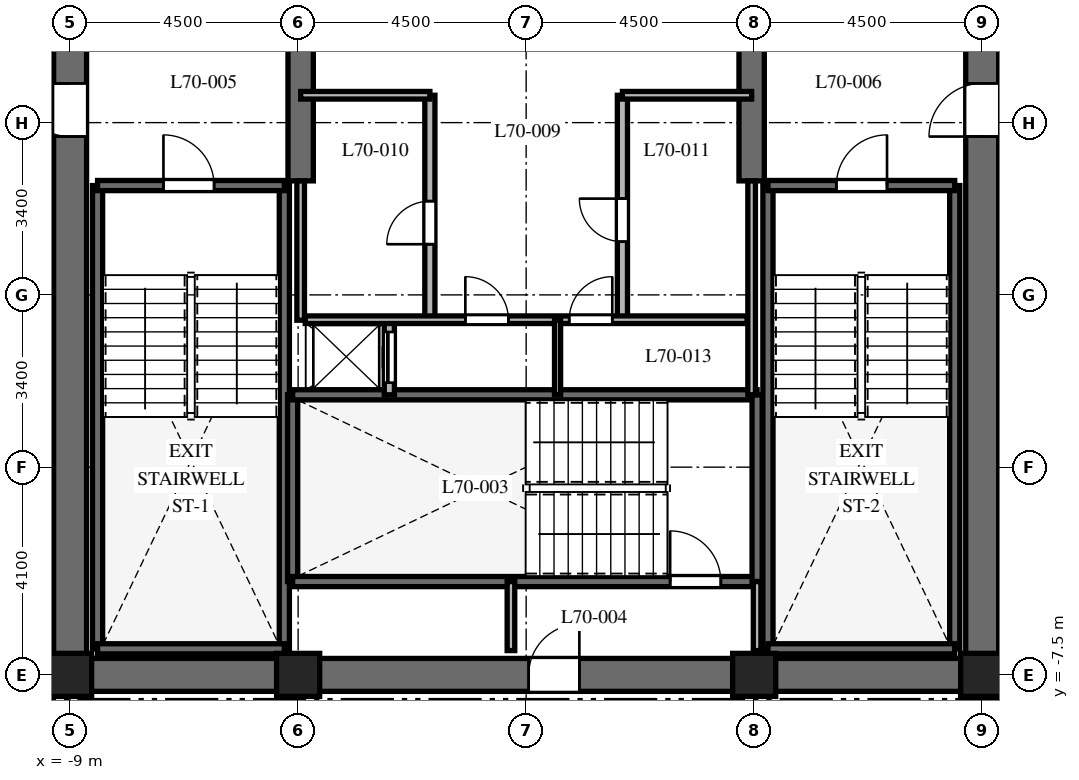
"""IFC4 building model, lengths in metres.
Left out: names, types, materials, properties, quantities, classifications, styles, units other than length and angle.
Written with IfcOpenShell. Run it as: python <this file> out.ifc"""

import sys

from ifc_helpers import new_model, si_unit, direction, frame, frame_2d, origin, origin_2d, place, context, subcontext, project, spatial, rectangle, extrude, element, fill, save


model = new_model("IFC4")
c1 = context("Model", 3, precision=1e-05, world=origin(), true_north=direction((0.0, 1.0)))
c2 = subcontext(c1, "Body", "Model", "MODEL_VIEW")
j1 = project(units=[si_unit("LENGTHUNIT", "METRE"), si_unit("PLANEANGLEUNIT", "RADIAN")], contexts=[c1])
p1 = place(None, origin())
s1 = spatial("IfcSite", under=j1, at=p1, CompositionType="ELEMENT")
p2 = place(p1, origin())
s2 = spatial("IfcBuilding", under=s1, at=p2, CompositionType="ELEMENT")
p3 = place(p2, frame((0.0, 0.0, 280.8)))
s3 = spatial("IfcBuildingStorey", under=s2, at=p3, CompositionType="ELEMENT", Elevation=280.8)
p4 = place(p3, frame((-9.325, -7.5, 0.0), z_axis=(0.0, 0.0, 1.0), x_axis=(1.0, 0.0, 0.0)))
e1 = element("IfcWall", 1, at=p4, inside=s3, PredefinedType="SHEAR", context=c2, shape_type="SweptSolid", body=[
    extrude(rectangle(XDim=18.65, YDim=0.65, at=frame_2d((9.325, 0.0))), origin(), (0.0, 0.0, 1.0), 3.9),
])
p5 = place(p4, frame((9.375, 0.0, 0.0)))
e2 = element("IfcOpeningElement", 2, at=p5, cuts=e1, PredefinedType="OPENING", context=c2, shape_type="SweptSolid", body=[
    extrude(rectangle(XDim=1.0, YDim=2.15, at=frame_2d((0.5, 1.075))), frame((0.0, 0.335, 0.0), z_axis=(0.0, -1.0, 0.0), x_axis=(1.0, 0.0, 0.0)), (0.0, 0.0, 1.0), 0.67),
])
p6 = place(p3, frame((-9.0, -7.175, 0.0), z_axis=(0.0, 0.0, 1.0), x_axis=(0.0, 1.0, 0.0)))
e3 = element("IfcWall", 3, at=p6, inside=s3, PredefinedType="SHEAR", context=c2, shape_type="SweptSolid", body=[
    extrude(rectangle(XDim=14.35, YDim=0.65, at=frame_2d((7.175, 0.0))), origin(), (0.0, 0.0, 1.0), 3.9),
])
p7 = place(p6, frame((10.3, 0.0, 0.0)))
e4 = element("IfcOpeningElement", 4, at=p7, cuts=e3, PredefinedType="OPENING", context=c2, shape_type="SweptSolid", body=[
    extrude(rectangle(XDim=1.05, YDim=2.15, at=frame_2d((0.525, 1.075))), frame((0.0, 0.335, 0.0), z_axis=(0.0, -1.0, 0.0), x_axis=(1.0, 0.0, 0.0)), (0.0, 0.0, 1.0), 0.67),
])
p8 = place(p3, frame((9.0, -7.175, 0.0), z_axis=(0.0, 0.0, 1.0), x_axis=(0.0, 1.0, 0.0)))
e5 = element("IfcWall", 5, at=p8, inside=s3, PredefinedType="SHEAR", context=c2, shape_type="SweptSolid", body=[
    extrude(rectangle(XDim=14.35, YDim=0.65, at=frame_2d((7.175, 0.0))), origin(), (0.0, 0.0, 1.0), 3.9),
])
p9 = place(p8, frame((10.3, 0.0, 0.0)))
e6 = element("IfcOpeningElement", 6, at=p9, cuts=e5, PredefinedType="OPENING", context=c2, shape_type="SweptSolid", body=[
    extrude(rectangle(XDim=1.05, YDim=2.15, at=frame_2d((0.525, 1.075))), frame((0.0, 0.335, 0.0), z_axis=(0.0, -1.0, 0.0), x_axis=(1.0, 0.0, 0.0)), (0.0, 0.0, 1.0), 0.67),
])
for number, where, z_axis, x_axis in (
    (7, (-4.45, 2.25, 0.0), (0.0, 0.0, 1.0), (0.0, 1.0, 0.0)),
    (8, (4.45, 2.25, 0.0), (0.0, 0.0, 1.0), (0.0, 1.0, 0.0)),
):
    element("IfcWall", number, at=place(p3, frame(where, z_axis=z_axis, x_axis=x_axis)), inside=s3, PredefinedType="SHEAR", context=c2, shape_type="SweptSolid", body=[
        extrude(rectangle(XDim=4.925, YDim=0.5, at=frame_2d((2.462, 0.0))), origin(), (0.0, 0.0, 1.0), 3.9),
    ])
for number, where, z_axis, x_axis in (
    (9, (-8.458, -6.985, 0.0), (0.0, 0.0, 1.0), (0.0, 1.0, 0.0)),
    (10, (-4.772, -6.985, 0.0), (0.0, 0.0, 1.0), (0.0, 1.0, 0.0)),
):
    element("IfcWall", number, at=place(p3, frame(where, z_axis=z_axis, x_axis=x_axis)), inside=s3, PredefinedType="SHEAR", context=c2, shape_type="SweptSolid", body=[
        extrude(rectangle(XDim=9.143, YDim=0.2, at=frame_2d((4.572, 0.0))), origin(), (0.0, 0.0, 1.0), 3.9),
    ])
p10 = place(p3, frame((-8.458, -6.985, 0.0), z_axis=(0.0, 0.0, 1.0), x_axis=(1.0, 0.0, 0.0)))
e11 = element("IfcWall", 11, at=p10, inside=s3, PredefinedType="SHEAR", context=c2, shape_type="SweptSolid", body=[
    extrude(rectangle(XDim=3.686, YDim=0.2, at=frame_2d((1.843, 0.0))), origin(), (0.0, 0.0, 1.0), 3.9),
])
p11 = place(p3, frame((-8.458, 2.158, 0.0), z_axis=(0.0, 0.0, 1.0), x_axis=(1.0, 0.0, 0.0)))
e12 = element("IfcWall", 12, at=p11, inside=s3, PredefinedType="SHEAR", context=c2, shape_type="SweptSolid", body=[
    extrude(rectangle(XDim=3.686, YDim=0.2, at=frame_2d((1.843, 0.0))), origin(), (0.0, 0.0, 1.0), 3.9),
])
p12 = place(p11, frame((1.3, 0.0, 0.0)))
e13 = element("IfcOpeningElement", 13, at=p12, cuts=e12, PredefinedType="OPENING", context=c2, shape_type="SweptSolid", body=[
    extrude(rectangle(XDim=1.0, YDim=2.15, at=frame_2d((0.5, 1.075))), frame((0.0, 0.11, 0.0), z_axis=(0.0, -1.0, 0.0), x_axis=(1.0, 0.0, 0.0)), (0.0, 0.0, 1.0), 0.22),
])
for number, where, z_axis, x_axis in (
    (14, (4.772, -6.985, 0.0), (0.0, 0.0, 1.0), (0.0, 1.0, 0.0)),
    (15, (8.458, -6.985, 0.0), (0.0, 0.0, 1.0), (0.0, 1.0, 0.0)),
):
    element("IfcWall", number, at=place(p3, frame(where, z_axis=z_axis, x_axis=x_axis)), inside=s3, PredefinedType="SHEAR", context=c2, shape_type="SweptSolid", body=[
        extrude(rectangle(XDim=9.143, YDim=0.2, at=frame_2d((4.572, 0.0))), origin(), (0.0, 0.0, 1.0), 3.9),
    ])
p13 = place(p3, frame((4.772, -6.985, 0.0), z_axis=(0.0, 0.0, 1.0), x_axis=(1.0, 0.0, 0.0)))
e16 = element("IfcWall", 16, at=p13, inside=s3, PredefinedType="SHEAR", context=c2, shape_type="SweptSolid", body=[
    extrude(rectangle(XDim=3.686, YDim=0.2, at=frame_2d((1.843, 0.0))), origin(), (0.0, 0.0, 1.0), 3.9),
])
p14 = place(p3, frame((4.772, 2.158, 0.0), z_axis=(0.0, 0.0, 1.0), x_axis=(1.0, 0.0, 0.0)))
e17 = element("IfcWall", 17, at=p14, inside=s3, PredefinedType="SHEAR", context=c2, shape_type="SweptSolid", body=[
    extrude(rectangle(XDim=3.686, YDim=0.2, at=frame_2d((1.843, 0.0))), origin(), (0.0, 0.0, 1.0), 3.9),
])
p15 = place(p14, frame((1.35, 0.0, 0.0)))
e18 = element("IfcOpeningElement", 18, at=p15, cuts=e17, PredefinedType="OPENING", context=c2, shape_type="SweptSolid", body=[
    extrude(rectangle(XDim=1.0, YDim=2.15, at=frame_2d((0.5, 1.075))), frame((0.0, 0.11, 0.0), z_axis=(0.0, -1.0, 0.0), x_axis=(1.0, 0.0, 0.0)), (0.0, 0.0, 1.0), 0.22),
])
p16 = place(p3, frame((-4.608, -5.658, 0.0), z_axis=(0.0, 0.0, 1.0), x_axis=(0.0, 1.0, 0.0)))
e19 = element("IfcWall", 19, at=p16, inside=s3, PredefinedType="SHEAR", context=c2, shape_type="SweptSolid", body=[
    extrude(rectangle(XDim=3.686, YDim=0.2, at=frame_2d((1.843, 0.0))), origin(), (0.0, 0.0, 1.0), 3.9),
])
p17 = place(p3, frame((-4.608, -5.658, 0.0), z_axis=(0.0, 0.0, 1.0), x_axis=(1.0, 0.0, 0.0)))
e20 = element("IfcWall", 20, at=p17, inside=s3, PredefinedType="SHEAR", context=c2, shape_type="SweptSolid", body=[
    extrude(rectangle(XDim=9.166, YDim=0.2, at=frame_2d((4.583, 0.0))), origin(), (0.0, 0.0, 1.0), 3.9),
])
p18 = place(p17, frame((7.45, 0.0, 0.0)))
e21 = element("IfcOpeningElement", 21, at=p18, cuts=e20, PredefinedType="OPENING", context=c2, shape_type="SweptSolid", body=[
    extrude(rectangle(XDim=1.0, YDim=2.15, at=frame_2d((0.5, 1.075))), frame((0.0, 0.11, 0.0), z_axis=(0.0, -1.0, 0.0), x_axis=(1.0, 0.0, 0.0)), (0.0, 0.0, 1.0), 0.22),
])
p19 = place(p3, frame((-4.608, -1.972, 0.0), z_axis=(0.0, 0.0, 1.0), x_axis=(1.0, 0.0, 0.0)))
e22 = element("IfcWall", 22, at=p19, inside=s3, PredefinedType="SHEAR", context=c2, shape_type="SweptSolid", body=[
    extrude(rectangle(XDim=9.166, YDim=0.2, at=frame_2d((4.583, 0.0))), origin(), (0.0, 0.0, 1.0), 3.9),
])
p20 = place(p3, frame((4.558, -5.658, 0.0), z_axis=(0.0, 0.0, 1.0), x_axis=(0.0, 1.0, 0.0)))
e23 = element("IfcWall", 23, at=p20, inside=s3, PredefinedType="SHEAR", context=c2, shape_type="SweptSolid", body=[
    extrude(rectangle(XDim=3.686, YDim=0.2, at=frame_2d((1.843, 0.0))), origin(), (0.0, 0.0, 1.0), 3.9),
])
for number, where, z_axis, x_axis in (
    (24, (-9.0, -7.5, 0.0), (0.0, 0.0, 1.0), (1.0, 0.0, 0.0)),
    (25, (-4.5, -7.5, 0.0), (0.0, 0.0, 1.0), (1.0, 0.0, 0.0)),
    (26, (4.5, -7.5, 0.0), (0.0, 0.0, 1.0), (1.0, 0.0, 0.0)),
    (27, (9.0, -7.5, 0.0), (0.0, 0.0, 1.0), (1.0, 0.0, 0.0)),
):
    element("IfcColumn", number, at=place(p3, frame(where, z_axis=z_axis, x_axis=x_axis)), inside=s3, PredefinedType="COLUMN", context=c2, shape_type="SweptSolid", body=[
        extrude(rectangle(XDim=0.85, YDim=0.85, at=origin_2d()), origin(), (0.0, 0.0, 1.0), 3.9),
    ])
for number, where, z_axis, x_axis in (
    (28, (-0.3, -7.02, 0.0), (0.0, 0.0, 1.0), (0.0, 1.0, 0.0)),
    (29, (4.558, -7.02, 0.0), (0.0, 0.0, 1.0), (0.0, 1.0, 0.0)),
):
    element("IfcWall", number, at=place(p3, frame(where, z_axis=z_axis, x_axis=x_axis)), inside=s3, PredefinedType="PARTITIONING", context=c2, shape_type="SweptSolid", body=[
        extrude(rectangle(XDim=1.362, YDim=0.15, at=frame_2d((0.681, 0.0))), origin(), (0.0, 0.0, 1.0), 3.6),
    ])
p21 = place(p3, frame((-2.7, -1.972, 0.0), z_axis=(0.0, 0.0, 1.0), x_axis=(0.0, 1.0, 0.0)))
e30 = element("IfcWall", 30, at=p21, inside=s3, PredefinedType="PARTITIONING", context=c2, shape_type="SweptSolid", body=[
    extrude(rectangle(XDim=1.472, YDim=0.2, at=frame_2d((0.736, 0.0))), origin(), (0.0, 0.0, 1.0), 3.6),
])
p22 = place(p21, frame((0.24, 0.0, 0.0)))
e31 = element("IfcOpeningElement", 31, at=p22, cuts=e30, PredefinedType="OPENING", context=c2, shape_type="SweptSolid", body=[
    extrude(rectangle(XDim=1.0, YDim=2.2, at=frame_2d((0.5, 1.1))), frame((0.0, 0.11, 0.0), z_axis=(0.0, -1.0, 0.0), x_axis=(1.0, 0.0, 0.0)), (0.0, 0.0, 1.0), 0.22),
])
p23 = place(p3, frame((-4.45, -0.5, 0.0), z_axis=(0.0, 0.0, 1.0), x_axis=(0.0, 1.0, 0.0)))
e32 = element("IfcWall", 32, at=p23, inside=s3, PredefinedType="PARTITIONING", context=c2, shape_type="SweptSolid", body=[
    extrude(rectangle(XDim=2.75, YDim=0.15, at=frame_2d((1.375, 0.0))), origin(), (0.0, 0.0, 1.0), 3.6),
])
p24 = place(p3, frame((4.45, -1.972, 0.0), z_axis=(0.0, 0.0, 1.0), x_axis=(0.0, 1.0, 0.0)))
e33 = element("IfcWall", 33, at=p24, inside=s3, PredefinedType="PARTITIONING", context=c2, shape_type="SweptSolid", body=[
    extrude(rectangle(XDim=4.222, YDim=0.15, at=frame_2d((2.111, 0.0))), origin(), (0.0, 0.0, 1.0), 3.6),
])
p25 = place(p3, frame((-1.9, -0.5, 0.0), z_axis=(0.0, 0.0, 1.0), x_axis=(0.0, 1.0, 0.0)))
e34 = element("IfcWall", 34, at=p25, inside=s3, PredefinedType="PARTITIONING", context=c2, shape_type="SweptSolid", body=[
    extrude(rectangle(XDim=4.44, YDim=0.2, at=frame_2d((2.22, 0.0))), origin(), (0.0, 0.0, 1.0), 3.6),
])
p26 = place(p25, frame((1.5, 0.0, 0.0)))
e35 = element("IfcOpeningElement", 35, at=p26, cuts=e34, PredefinedType="OPENING", context=c2, shape_type="SweptSolid", body=[
    extrude(rectangle(XDim=0.85, YDim=2.03, at=frame_2d((0.425, 1.015))), frame((0.0, 0.11, 0.0), z_axis=(0.0, -1.0, 0.0), x_axis=(1.0, 0.0, 0.0)), (0.0, 0.0, 1.0), 0.22),
])
p27 = place(p3, frame((-4.45, 3.94, 0.0), z_axis=(0.0, 0.0, 1.0), x_axis=(1.0, 0.0, 0.0)))
e36 = element("IfcWall", 36, at=p27, inside=s3, PredefinedType="PARTITIONING", context=c2, shape_type="SweptSolid", body=[
    extrude(rectangle(XDim=2.55, YDim=0.15, at=frame_2d((1.275, 0.0))), origin(), (0.0, 0.0, 1.0), 3.6),
])
p28 = place(p3, frame((1.9, -0.5, 0.0), z_axis=(0.0, 0.0, 1.0), x_axis=(0.0, 1.0, 0.0)))
e37 = element("IfcWall", 37, at=p28, inside=s3, PredefinedType="PARTITIONING", context=c2, shape_type="SweptSolid", body=[
    extrude(rectangle(XDim=4.44, YDim=0.2, at=frame_2d((2.22, 0.0))), origin(), (0.0, 0.0, 1.0), 3.6),
])
p29 = place(p28, frame((1.55, 0.0, 0.0)))
e38 = element("IfcOpeningElement", 38, at=p29, cuts=e37, PredefinedType="OPENING", context=c2, shape_type="SweptSolid", body=[
    extrude(rectangle(XDim=0.85, YDim=2.03, at=frame_2d((0.425, 1.015))), frame((0.0, 0.11, 0.0), z_axis=(0.0, -1.0, 0.0), x_axis=(1.0, 0.0, 0.0)), (0.0, 0.0, 1.0), 0.22),
])
p30 = place(p3, frame((1.9, 3.94, 0.0), z_axis=(0.0, 0.0, 1.0), x_axis=(1.0, 0.0, 0.0)))
e39 = element("IfcWall", 39, at=p30, inside=s3, PredefinedType="PARTITIONING", context=c2, shape_type="SweptSolid", body=[
    extrude(rectangle(XDim=2.55, YDim=0.15, at=frame_2d((1.275, 0.0))), origin(), (0.0, 0.0, 1.0), 3.6),
])
p31 = place(p3, frame((-4.36, -0.49, 0.0), z_axis=(0.0, 0.0, 1.0), x_axis=(1.0, 0.0, 0.0)))
e40 = element("IfcWall", 40, at=p31, inside=s3, PredefinedType="PARTITIONING", context=c2, shape_type="SweptSolid", body=[
    extrude(rectangle(XDim=8.72, YDim=0.15, at=frame_2d((4.36, 0.0))), origin(), (0.0, 0.0, 1.0), 3.6),
])
p32 = place(p31, frame((3.16, 0.0, 0.0)))
e41 = element("IfcOpeningElement", 41, at=p32, cuts=e40, PredefinedType="OPENING", context=c2, shape_type="SweptSolid", body=[
    extrude(rectangle(XDim=0.85, YDim=2.03, at=frame_2d((0.425, 1.015))), frame((0.0, 0.085, 0.0), z_axis=(0.0, -1.0, 0.0), x_axis=(1.0, 0.0, 0.0)), (0.0, 0.0, 1.0), 0.17),
])
p33 = place(p31, frame((5.21, 0.0, 0.0)))
e42 = element("IfcOpeningElement", 42, at=p33, cuts=e40, PredefinedType="OPENING", context=c2, shape_type="SweptSolid", body=[
    extrude(rectangle(XDim=0.85, YDim=2.03, at=frame_2d((0.425, 1.015))), frame((0.0, 0.085, 0.0), z_axis=(0.0, -1.0, 0.0), x_axis=(1.0, 0.0, 0.0)), (0.0, 0.0, 1.0), 0.17),
])
p34 = place(p3, frame((0.62, -1.972, 0.0), z_axis=(0.0, 0.0, 1.0), x_axis=(0.0, 1.0, 0.0)))
e43 = element("IfcWall", 43, at=p34, inside=s3, PredefinedType="PARTITIONING", context=c2, shape_type="SweptSolid", body=[
    extrude(rectangle(XDim=1.472, YDim=0.12, at=frame_2d((0.736, 0.0))), origin(), (0.0, 0.0, 1.0), 3.6),
])
p35 = place(p12, origin())
e44 = element("IfcDoor", 44, at=p35, inside=s3, OperationType="SINGLE_SWING_LEFT", PredefinedType="DOOR", context=c2, shape_type="SweptSolid", body=[
    extrude(rectangle(XDim=1.0, YDim=2.15, at=frame_2d((0.5, 1.075))), frame((0.0, 0.025, 0.0), z_axis=(0.0, -1.0, 0.0), x_axis=(1.0, 0.0, 0.0)), (0.0, 0.0, 1.0), 0.05),
])
fill(e13, e44)
p36 = place(p15, origin())
e45 = element("IfcDoor", 45, at=p36, inside=s3, OperationType="SINGLE_SWING_RIGHT", PredefinedType="DOOR", context=c2, shape_type="SweptSolid", body=[
    extrude(rectangle(XDim=1.0, YDim=2.15, at=frame_2d((0.5, 1.075))), frame((0.0, 0.025, 0.0), z_axis=(0.0, -1.0, 0.0), x_axis=(1.0, 0.0, 0.0)), (0.0, 0.0, 1.0), 0.05),
])
fill(e18, e45)
p37 = place(p18, origin())
e46 = element("IfcDoor", 46, at=p37, inside=s3, OperationType="SINGLE_SWING_LEFT", PredefinedType="DOOR", context=c2, shape_type="SweptSolid", body=[
    extrude(rectangle(XDim=1.0, YDim=2.15, at=frame_2d((0.5, 1.075))), frame((0.0, 0.025, 0.0), z_axis=(0.0, -1.0, 0.0), x_axis=(1.0, 0.0, 0.0)), (0.0, 0.0, 1.0), 0.05),
])
fill(e21, e46)
p38 = place(p5, origin())
e47 = element("IfcDoor", 47, at=p38, inside=s3, OperationType="SINGLE_SWING_RIGHT", PredefinedType="DOOR", context=c2, shape_type="SweptSolid", body=[
    extrude(rectangle(XDim=1.0, YDim=2.15, at=frame_2d((0.5, 1.075))), frame((0.0, 0.025, 0.0), z_axis=(0.0, -1.0, 0.0), x_axis=(1.0, 0.0, 0.0)), (0.0, 0.0, 1.0), 0.05),
])
fill(e2, e47)
p39 = place(p7, origin())
e48 = element("IfcDoor", 48, at=p39, inside=s3, OperationType="SINGLE_SWING_RIGHT", PredefinedType="DOOR", context=c2, shape_type="SweptSolid", body=[
    extrude(rectangle(XDim=1.05, YDim=2.15, at=frame_2d((0.525, 1.075))), frame((0.0, 0.025, 0.0), z_axis=(0.0, -1.0, 0.0), x_axis=(1.0, 0.0, 0.0)), (0.0, 0.0, 1.0), 0.05),
])
fill(e4, e48)
p40 = place(p9, origin())
e49 = element("IfcDoor", 49, at=p40, inside=s3, OperationType="SINGLE_SWING_LEFT", PredefinedType="DOOR", context=c2, shape_type="SweptSolid", body=[
    extrude(rectangle(XDim=1.05, YDim=2.15, at=frame_2d((0.525, 1.075))), frame((0.0, 0.025, 0.0), z_axis=(0.0, -1.0, 0.0), x_axis=(1.0, 0.0, 0.0)), (0.0, 0.0, 1.0), 0.05),
])
fill(e6, e49)
p41 = place(p22, origin())
e50 = element("IfcDoor", 50, at=p41, inside=s3, OperationType="SLIDING_TO_LEFT", PredefinedType="DOOR", context=c2, shape_type="SweptSolid", body=[
    extrude(rectangle(XDim=1.0, YDim=2.2, at=frame_2d((0.5, 1.1))), frame((0.0, 0.025, 0.0), z_axis=(0.0, -1.0, 0.0), x_axis=(1.0, 0.0, 0.0)), (0.0, 0.0, 1.0), 0.05),
])
fill(e31, e50)
p42 = place(p26, origin())
e51 = element("IfcDoor", 51, at=p42, inside=s3, OperationType="SINGLE_SWING_LEFT", PredefinedType="DOOR", context=c2, shape_type="SweptSolid", body=[
    extrude(rectangle(XDim=0.85, YDim=2.03, at=frame_2d((0.425, 1.015))), frame((0.0, 0.025, 0.0), z_axis=(0.0, -1.0, 0.0), x_axis=(1.0, 0.0, 0.0)), (0.0, 0.0, 1.0), 0.05),
])
fill(e35, e51)
p43 = place(p29, origin())
e52 = element("IfcDoor", 52, at=p43, inside=s3, OperationType="SINGLE_SWING_RIGHT", PredefinedType="DOOR", context=c2, shape_type="SweptSolid", body=[
    extrude(rectangle(XDim=0.85, YDim=2.03, at=frame_2d((0.425, 1.015))), frame((0.0, 0.025, 0.0), z_axis=(0.0, -1.0, 0.0), x_axis=(1.0, 0.0, 0.0)), (0.0, 0.0, 1.0), 0.05),
])
fill(e38, e52)
p44 = place(p32, origin())
e53 = element("IfcDoor", 53, at=p44, inside=s3, OperationType="SINGLE_SWING_LEFT", PredefinedType="DOOR", context=c2, shape_type="SweptSolid", body=[
    extrude(rectangle(XDim=0.85, YDim=2.03, at=frame_2d((0.425, 1.015))), frame((0.0, 0.025, 0.0), z_axis=(0.0, -1.0, 0.0), x_axis=(1.0, 0.0, 0.0)), (0.0, 0.0, 1.0), 0.05),
])
fill(e41, e53)
p45 = place(p33, origin())
e54 = element("IfcDoor", 54, at=p45, inside=s3, OperationType="SINGLE_SWING_RIGHT", PredefinedType="DOOR", context=c2, shape_type="SweptSolid", body=[
    extrude(rectangle(XDim=0.85, YDim=2.03, at=frame_2d((0.425, 1.015))), frame((0.0, 0.025, 0.0), z_axis=(0.0, -1.0, 0.0), x_axis=(1.0, 0.0, 0.0)), (0.0, 0.0, 1.0), 0.05),
])
fill(e42, e54)
save(model, sys.argv[1])
